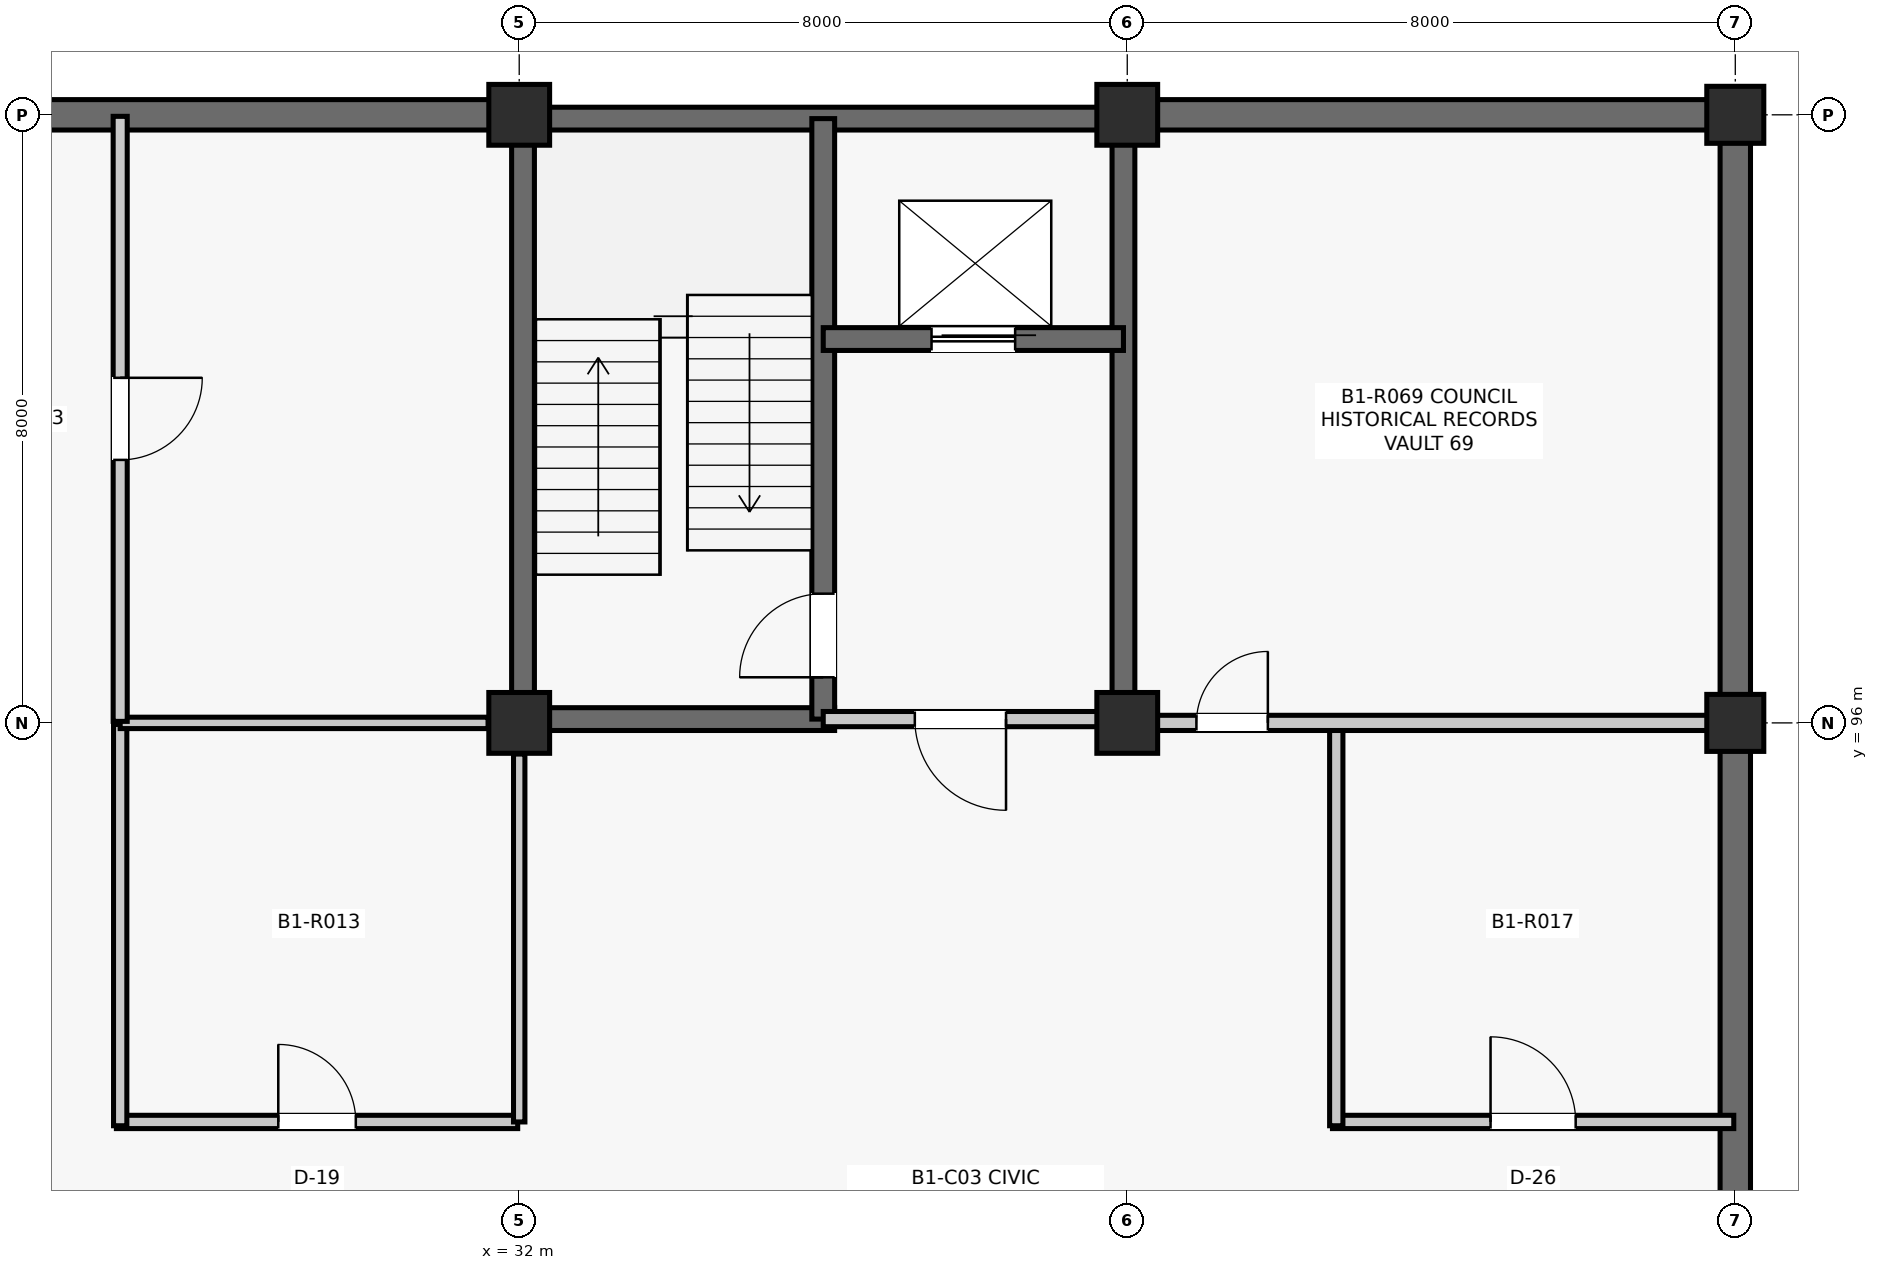
"""IFC4 building model, lengths in metres.
Left out: names, types, materials, properties, quantities, classifications, styles, units other than length and angle.
Written with IfcOpenShell. Run it as: python <this file> out.ifc"""

import sys

from ifc_helpers import new_model, si_unit, direction, frame, frame_2d, origin, origin_2d, place, context, subcontext, project, spatial, rectangle, extrude, element, fill, save


model = new_model("IFC4")
c1 = context("Model", 3, precision=1e-05, world=origin(), true_north=direction((0.0, 1.0)))
c2 = subcontext(c1, "Body", "Model", "MODEL_VIEW")
j1 = project(units=[si_unit("LENGTHUNIT", "METRE"), si_unit("PLANEANGLEUNIT", "RADIAN")], contexts=[c1])
p1 = place(None, origin())
s1 = spatial("IfcSite", under=j1, at=p1, CompositionType="ELEMENT")
p2 = place(p1, origin())
s2 = spatial("IfcBuilding", under=s1, at=p2, CompositionType="ELEMENT")
p3 = place(p2, frame((0.0, 0.0, -4.29)))
s3 = spatial("IfcBuildingStorey", under=s2, at=p3, CompositionType="ELEMENT", Elevation=-4.29)
for number, where, z_axis, x_axis in (
    (1, (32.0, 96.0, 0.0), (0.0, 0.0, 1.0), (1.0, 0.0, 0.0)),
    (2, (32.0, 104.0, 0.0), (0.0, 0.0, 1.0), (1.0, 0.0, 0.0)),
    (3, (40.0, 96.0, 0.0), (0.0, 0.0, 1.0), (1.0, 0.0, 0.0)),
    (4, (40.0, 104.0, 0.0), (0.0, 0.0, 1.0), (1.0, 0.0, 0.0)),
):
    element("IfcColumn", number, at=place(p3, frame(where, z_axis=z_axis, x_axis=x_axis)), inside=s3, PredefinedType="COLUMN", context=c2, shape_type="SweptSolid", body=[
        extrude(rectangle(XDim=0.8, YDim=0.8, at=origin_2d()), origin(), (0.0, 0.0, 1.0), 4.29),
    ])
for number, where, z_axis, x_axis in (
    (5, (48.0, 96.0, 0.0), (0.0, 0.0, 1.0), (1.0, 0.0, 0.0)),
    (6, (48.0, 104.0, 0.0), (0.0, 0.0, 1.0), (1.0, 0.0, 0.0)),
):
    element("IfcColumn", number, at=place(p3, frame(where, z_axis=z_axis, x_axis=x_axis)), inside=s3, PredefinedType="COLUMN", context=c2, shape_type="SweptSolid", body=[
        extrude(rectangle(XDim=0.75, YDim=0.75, at=origin_2d()), origin(), (0.0, 0.0, 1.0), 4.29),
    ])
p4 = place(p3, frame((24.36, 104.0, 0.0), z_axis=(0.0, 0.0, 1.0), x_axis=(1.0, 0.0, 0.0)))
e7 = element("IfcWall", 7, at=p4, inside=s3, PredefinedType="SHEAR", context=c2, shape_type="SweptSolid", body=[
    extrude(rectangle(XDim=7.255, YDim=0.4, at=frame_2d((3.627, 0.0))), origin(), (0.0, 0.0, 1.0), 3.314),
])
p5 = place(p3, frame((48.0, 88.36, 0.0), z_axis=(0.0, 0.0, 1.0), x_axis=(0.0, 1.0, 0.0)))
e8 = element("IfcWall", 8, at=p5, inside=s3, PredefinedType="SHEAR", context=c2, shape_type="SweptSolid", body=[
    extrude(rectangle(XDim=7.28, YDim=0.4, at=frame_2d((3.64, 0.0))), origin(), (0.0, 0.0, 1.0), 3.59),
])
p6 = place(p3, frame((40.385, 104.0, 0.0), z_axis=(0.0, 0.0, 1.0), x_axis=(1.0, 0.0, 0.0)))
e9 = element("IfcWall", 9, at=p6, inside=s3, PredefinedType="SHEAR", context=c2, shape_type="SweptSolid", body=[
    extrude(rectangle(XDim=7.255, YDim=0.4, at=frame_2d((3.627, 0.0))), origin(), (0.0, 0.0, 1.0), 3.323),
])
p7 = place(p3, frame((48.0, 96.36, 0.0), z_axis=(0.0, 0.0, 1.0), x_axis=(0.0, 1.0, 0.0)))
e10 = element("IfcWall", 10, at=p7, inside=s3, PredefinedType="SHEAR", context=c2, shape_type="SweptSolid", body=[
    extrude(rectangle(XDim=7.28, YDim=0.4, at=frame_2d((3.64, 0.0))), origin(), (0.0, 0.0, 1.0), 3.654),
])
for number, where, z_axis, x_axis in (
    (11, (32.05, 96.29, 0.0), (0.0, 0.0, 1.0), (0.0, 1.0, 0.0)),
    (12, (32.29, 103.95, 0.0), (0.0, 0.0, 1.0), (1.0, 0.0, 0.0)),
    (13, (39.95, 96.29, 0.0), (0.0, 0.0, 1.0), (0.0, 1.0, 0.0)),
):
    element("IfcWall", number, at=place(p3, frame(where, z_axis=z_axis, x_axis=x_axis)), inside=s3, PredefinedType="SHEAR", context=c2, shape_type="SweptSolid", body=[
        extrude(rectangle(XDim=7.42, YDim=0.3, at=frame_2d((3.71, 0.0))), origin(), (0.0, 0.0, 1.0), 4.015),
    ])
p8 = place(p3, frame((32.29, 96.05, 0.0), z_axis=(0.0, 0.0, 1.0), x_axis=(1.0, 0.0, 0.0)))
e14 = element("IfcWall", 14, at=p8, inside=s3, PredefinedType="SHEAR", context=c2, shape_type="SweptSolid", body=[
    extrude(rectangle(XDim=3.86, YDim=0.3, at=frame_2d((1.93, 0.0))), origin(), (0.0, 0.0, 1.0), 4.015),
])
p9 = place(p3, frame((36.0, 96.05, 0.0), z_axis=(0.0, 0.0, 1.0), x_axis=(0.0, 1.0, 0.0)))
e15 = element("IfcWall", 15, at=p9, inside=s3, PredefinedType="SHEAR", context=c2, shape_type="SweptSolid", body=[
    extrude(rectangle(XDim=7.9, YDim=0.3, at=frame_2d((3.95, 0.0))), origin(), (0.0, 0.0, 1.0), 4.015),
])
p10 = place(p9, frame((0.55, 0.0, 0.0)))
e16 = element("IfcOpeningElement", 16, at=p10, cuts=e15, PredefinedType="OPENING", context=c2, shape_type="SweptSolid", body=[
    extrude(rectangle(XDim=1.1, YDim=2.15, at=frame_2d((0.55, 1.075))), frame((0.0, 0.16, 0.0), z_axis=(0.0, -1.0, 0.0), x_axis=(1.0, 0.0, 0.0)), (0.0, 0.0, 1.0), 0.32),
])
p11 = place(p3, frame((36.0, 101.05, 0.0), z_axis=(0.0, 0.0, 1.0), x_axis=(1.0, 0.0, 0.0)))
e17 = element("IfcWall", 17, at=p11, inside=s3, PredefinedType="SHEAR", context=c2, shape_type="SweptSolid", body=[
    extrude(rectangle(XDim=3.95, YDim=0.3, at=frame_2d((1.975, 0.0))), origin(), (0.0, 0.0, 1.0), 4.015),
])
p12 = place(p11, frame((1.425, 0.0, 0.0)))
e18 = element("IfcOpeningElement", 18, at=p12, cuts=e17, PredefinedType="OPENING", context=c2, shape_type="SweptSolid", body=[
    extrude(rectangle(XDim=1.1, YDim=2.2, at=frame_2d((0.55, 1.1))), frame((0.0, 0.16, 0.0), z_axis=(0.0, -1.0, 0.0), x_axis=(1.0, 0.0, 0.0)), (0.0, 0.0, 1.0), 0.32),
])
p13 = place(p3, frame((36.0, 96.05, 0.0), z_axis=(0.0, 0.0, 1.0), x_axis=(1.0, 0.0, 0.0)))
e19 = element("IfcWall", 19, at=p13, inside=s3, PredefinedType="PARTITIONING", context=c2, shape_type="SweptSolid", body=[
    extrude(rectangle(XDim=3.61, YDim=0.2, at=frame_2d((1.805, 0.0))), origin(), (0.0, 0.0, 1.0), 3.307),
])
p14 = place(p13, frame((1.205, 0.0, 0.0)))
e20 = element("IfcOpeningElement", 20, at=p14, cuts=e19, PredefinedType="OPENING", context=c2, shape_type="SweptSolid", body=[
    extrude(rectangle(XDim=1.2, YDim=2.15, at=frame_2d((0.6, 1.075))), frame((0.0, 0.11, 0.0), z_axis=(0.0, -1.0, 0.0), x_axis=(1.0, 0.0, 0.0)), (0.0, 0.0, 1.0), 0.22),
])
p15 = place(p3, frame((26.7, 90.75, 0.0), z_axis=(0.0, 0.0, 1.0), x_axis=(1.0, 0.0, 0.0)))
e21 = element("IfcWall", 21, at=p15, inside=s3, PredefinedType="PARTITIONING", context=c2, shape_type="SweptSolid", body=[
    extrude(rectangle(XDim=5.28, YDim=0.175, at=frame_2d((2.64, 0.0))), origin(), (0.0, 0.0, 1.0), 3.451),
])
p16 = place(p15, frame((2.13, 0.0, 0.0)))
e22 = element("IfcOpeningElement", 22, at=p16, cuts=e21, PredefinedType="OPENING", context=c2, shape_type="SweptSolid", body=[
    extrude(rectangle(XDim=1.02, YDim=2.2, at=frame_2d((0.51, 1.1))), frame((0.0, 0.097, 0.0), z_axis=(0.0, -1.0, 0.0), x_axis=(1.0, 0.0, 0.0)), (0.0, 0.0, 1.0), 0.195),
])
p17 = place(p3, frame((26.75, 90.7, 0.0), z_axis=(0.0, 0.0, 1.0), x_axis=(0.0, 1.0, 0.0)))
e23 = element("IfcWall", 23, at=p17, inside=s3, PredefinedType="PARTITIONING", context=c2, shape_type="SweptSolid", body=[
    extrude(rectangle(XDim=5.28, YDim=0.175, at=frame_2d((2.64, 0.0))), origin(), (0.0, 0.0, 1.0), 3.384),
])
p18 = place(p3, frame((26.75, 96.0, 0.0), z_axis=(0.0, 0.0, 1.0), x_axis=(1.0, 0.0, 0.0)))
e24 = element("IfcWall", 24, at=p18, inside=s3, PredefinedType="PARTITIONING", context=c2, shape_type="SweptSolid", body=[
    extrude(rectangle(XDim=4.84, YDim=0.15, at=frame_2d((2.42, 0.0))), origin(), (0.0, 0.0, 1.0), 3.384),
])
p19 = place(p3, frame((32.0, 90.75, 0.0), z_axis=(0.0, 0.0, 1.0), x_axis=(0.0, 1.0, 0.0)))
e25 = element("IfcWall", 25, at=p19, inside=s3, PredefinedType="PARTITIONING", context=c2, shape_type="SweptSolid", body=[
    extrude(rectangle(XDim=4.84, YDim=0.15, at=frame_2d((2.42, 0.0))), origin(), (0.0, 0.0, 1.0), 3.451),
])
p20 = place(p3, frame((26.75, 96.02, 0.0), z_axis=(0.0, 0.0, 1.0), x_axis=(0.0, 1.0, 0.0)))
e26 = element("IfcWall", 26, at=p20, inside=s3, PredefinedType="PARTITIONING", context=c2, shape_type="SweptSolid", body=[
    extrude(rectangle(XDim=7.96, YDim=0.185, at=frame_2d((3.98, 0.0))), origin(), (0.0, 0.0, 1.0), 3.307),
])
p21 = place(p20, frame((3.44, 0.0, 0.0)))
e27 = element("IfcOpeningElement", 27, at=p21, cuts=e26, PredefinedType="OPENING", context=c2, shape_type="SweptSolid", body=[
    extrude(rectangle(XDim=1.08, YDim=2.2, at=frame_2d((0.54, 1.1))), frame((0.0, 0.103, 0.0), z_axis=(0.0, -1.0, 0.0), x_axis=(1.0, 0.0, 0.0)), (0.0, 0.0, 1.0), 0.205),
])
p22 = place(p3, frame((42.7, 90.75, 0.0), z_axis=(0.0, 0.0, 1.0), x_axis=(1.0, 0.0, 0.0)))
e28 = element("IfcWall", 28, at=p22, inside=s3, PredefinedType="PARTITIONING", context=c2, shape_type="SweptSolid", body=[
    extrude(rectangle(XDim=5.28, YDim=0.175, at=frame_2d((2.64, 0.0))), origin(), (0.0, 0.0, 1.0), 3.583),
])
p23 = place(p22, frame((2.08, 0.0, 0.0)))
e29 = element("IfcOpeningElement", 29, at=p23, cuts=e28, PredefinedType="OPENING", context=c2, shape_type="SweptSolid", body=[
    extrude(rectangle(XDim=1.12, YDim=2.22, at=frame_2d((0.56, 1.11))), frame((0.0, 0.097, 0.0), z_axis=(0.0, -1.0, 0.0), x_axis=(1.0, 0.0, 0.0)), (0.0, 0.0, 1.0), 0.195),
])
p24 = place(p3, frame((42.75, 90.7, 0.0), z_axis=(0.0, 0.0, 1.0), x_axis=(0.0, 1.0, 0.0)))
e30 = element("IfcWall", 30, at=p24, inside=s3, PredefinedType="PARTITIONING", context=c2, shape_type="SweptSolid", body=[
    extrude(rectangle(XDim=5.28, YDim=0.175, at=frame_2d((2.64, 0.0))), origin(), (0.0, 0.0, 1.0), 3.383),
])
p25 = place(p3, frame((40.39, 96.0, 0.0), z_axis=(0.0, 0.0, 1.0), x_axis=(1.0, 0.0, 0.0)))
e31 = element("IfcWall", 31, at=p25, inside=s3, PredefinedType="PARTITIONING", context=c2, shape_type="SweptSolid", body=[
    extrude(rectangle(XDim=7.245, YDim=0.2, at=frame_2d((3.623, 0.0))), origin(), (0.0, 0.0, 1.0), 3.383),
])
p26 = place(p25, frame((0.52, 0.0, 0.0)))
e32 = element("IfcOpeningElement", 32, at=p26, cuts=e31, PredefinedType="OPENING", context=c2, shape_type="SweptSolid", body=[
    extrude(rectangle(XDim=0.94, YDim=2.12, at=frame_2d((0.47, 1.06))), frame((0.0, 0.11, 0.0), z_axis=(0.0, -1.0, 0.0), x_axis=(1.0, 0.0, 0.0)), (0.0, 0.0, 1.0), 0.22),
])
p27 = place(p10, origin())
e33 = element("IfcDoor", 33, at=p27, inside=s3, OperationType="SINGLE_SWING_LEFT", PredefinedType="DOOR", context=c2, shape_type="SweptSolid", body=[
    extrude(rectangle(XDim=1.1, YDim=2.15, at=frame_2d((0.55, 1.075))), frame((0.0, 0.025, 0.0), z_axis=(0.0, -1.0, 0.0), x_axis=(1.0, 0.0, 0.0)), (0.0, 0.0, 1.0), 0.05),
])
fill(e16, e33)
p28 = place(p12, origin())
e34 = element("IfcDoor", 34, at=p28, inside=s3, OperationType="SLIDING_TO_LEFT", PredefinedType="DOOR", context=c2, shape_type="SweptSolid", body=[
    extrude(rectangle(XDim=1.1, YDim=2.2, at=frame_2d((0.55, 1.1))), frame((0.0, 0.025, 0.0), z_axis=(0.0, -1.0, 0.0), x_axis=(1.0, 0.0, 0.0)), (0.0, 0.0, 1.0), 0.05),
])
fill(e18, e34)
p29 = place(p14, frame((1.2, 0.0, 0.0), z_axis=(0.0, 0.0, 1.0), x_axis=(-1.0, 0.0, 0.0)))
e35 = element("IfcDoor", 35, at=p29, inside=s3, OperationType="SINGLE_SWING_RIGHT", PredefinedType="DOOR", context=c2, shape_type="SweptSolid", body=[
    extrude(rectangle(XDim=1.2, YDim=2.15, at=frame_2d((0.6, 1.075))), frame((0.0, 0.025, 0.0), z_axis=(0.0, -1.0, 0.0), x_axis=(1.0, 0.0, 0.0)), (0.0, 0.0, 1.0), 0.05),
])
fill(e20, e35)
p30 = place(p16, origin())
e36 = element("IfcDoor", 36, at=p30, inside=s3, OperationType="SINGLE_SWING_LEFT", PredefinedType="DOOR", context=c2, shape_type="SweptSolid", body=[
    extrude(rectangle(XDim=1.02, YDim=2.2, at=frame_2d((0.51, 1.1))), frame((0.0, 0.025, 0.0), z_axis=(0.0, -1.0, 0.0), x_axis=(1.0, 0.0, 0.0)), (0.0, 0.0, 1.0), 0.05),
])
fill(e22, e36)
p31 = place(p21, frame((1.08, 0.0, 0.0), z_axis=(0.0, 0.0, 1.0), x_axis=(-1.0, 0.0, 0.0)))
e37 = element("IfcDoor", 37, at=p31, inside=s3, OperationType="SINGLE_SWING_RIGHT", PredefinedType="DOOR", context=c2, shape_type="SweptSolid", body=[
    extrude(rectangle(XDim=1.08, YDim=2.2, at=frame_2d((0.54, 1.1))), frame((0.0, 0.025, 0.0), z_axis=(0.0, -1.0, 0.0), x_axis=(1.0, 0.0, 0.0)), (0.0, 0.0, 1.0), 0.05),
])
fill(e27, e37)
p32 = place(p23, origin())
e38 = element("IfcDoor", 38, at=p32, inside=s3, OperationType="SINGLE_SWING_LEFT", PredefinedType="DOOR", context=c2, shape_type="SweptSolid", body=[
    extrude(rectangle(XDim=1.12, YDim=2.22, at=frame_2d((0.56, 1.11))), frame((0.0, 0.025, 0.0), z_axis=(0.0, -1.0, 0.0), x_axis=(1.0, 0.0, 0.0)), (0.0, 0.0, 1.0), 0.05),
])
fill(e29, e38)
p33 = place(p26, origin())
e39 = element("IfcDoor", 39, at=p33, inside=s3, OperationType="SINGLE_SWING_RIGHT", PredefinedType="DOOR", context=c2, shape_type="SweptSolid", body=[
    extrude(rectangle(XDim=0.94, YDim=2.12, at=frame_2d((0.47, 1.06))), frame((0.0, 0.025, 0.0), z_axis=(0.0, -1.0, 0.0), x_axis=(1.0, 0.0, 0.0)), (0.0, 0.0, 1.0), 0.05),
])
fill(e32, e39)
save(model, sys.argv[1])
